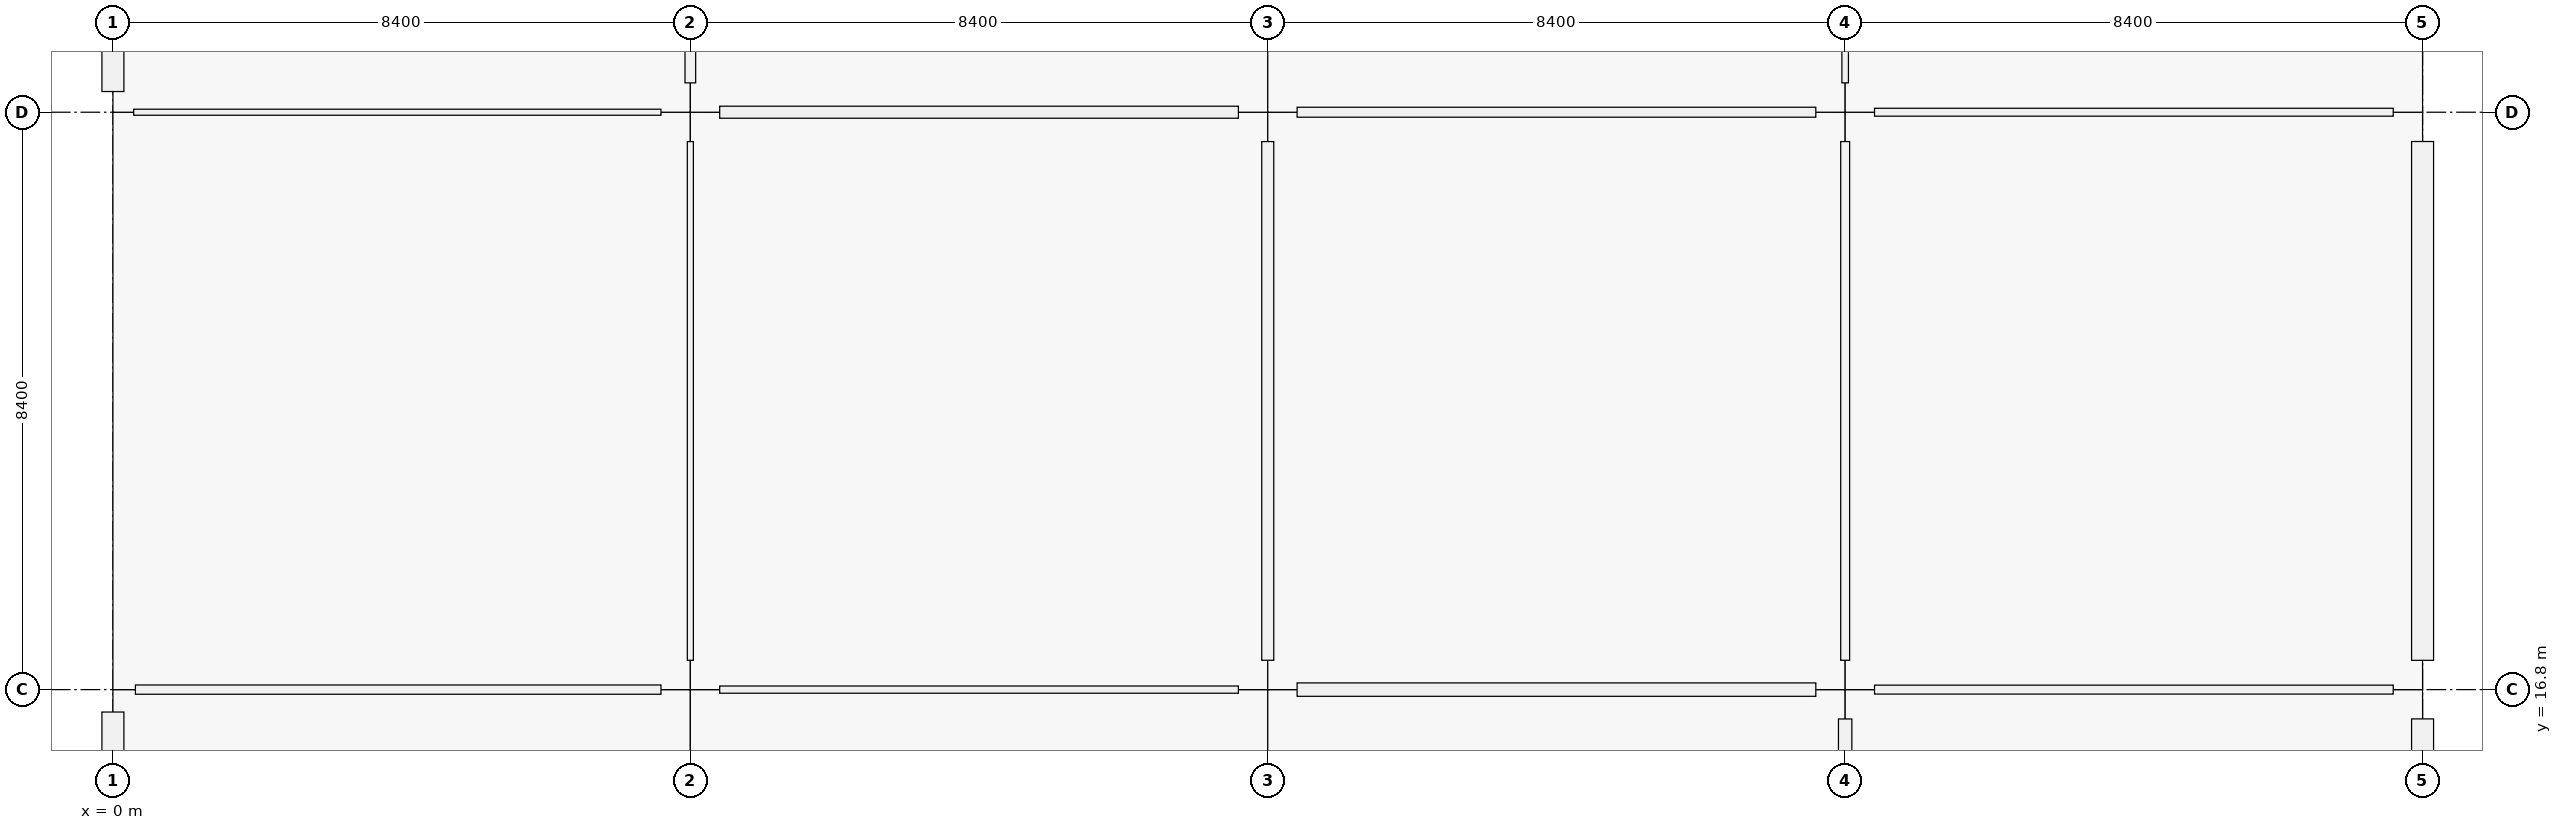
"""IFC4 building model, lengths in metres.
Left out: names, types, materials, properties, quantities, classifications, styles, units other than length and angle.
Written with IfcOpenShell. Run it as: python <this file> out.ifc"""

import sys

from ifc_helpers import new_model, si_unit, direction, frame, frame_2d, origin, origin_2d, place, context, subcontext, project, spatial, rectangle, extrude, element, fill, save


model = new_model("IFC4")
c1 = context("Model", 3, precision=1e-05, world=origin(), true_north=direction((0.0, 1.0)))
c2 = subcontext(c1, "Body", "Model", "MODEL_VIEW")
j1 = project(units=[si_unit("LENGTHUNIT", "METRE"), si_unit("PLANEANGLEUNIT", "RADIAN")], contexts=[c1])
p1 = place(None, origin())
s1 = spatial("IfcSite", under=j1, at=p1, CompositionType="ELEMENT")
p2 = place(p1, origin())
s2 = spatial("IfcBuilding", under=s1, at=p2, CompositionType="ELEMENT")
p3 = place(p2, origin())
s3 = spatial("IfcBuildingStorey", under=s2, at=p3, CompositionType="ELEMENT", Elevation=0.0)
p4 = place(p3, frame((0.0, 16.8, 0.0), z_axis=(0.0, 0.0, 1.0), x_axis=(1.0, 0.0, 0.0)))
e1 = element("IfcColumn", 1, at=p4, inside=s3, PredefinedType="COLUMN", context=c2, shape_type="SweptSolid", body=[
    extrude(rectangle(XDim=0.65, YDim=0.65, at=origin_2d()), origin(), (0.0, 0.0, 1.0), 5.76),
])
p5 = place(p3, frame((0.0, 25.2, 0.0), z_axis=(0.0, 0.0, 1.0), x_axis=(1.0, 0.0, 0.0)))
e2 = element("IfcColumn", 2, at=p5, inside=s3, PredefinedType="COLUMN", context=c2, shape_type="SweptSolid", body=[
    extrude(rectangle(XDim=0.6, YDim=0.6, at=origin_2d()), origin(), (0.0, 0.0, 1.0), 5.76),
])
for number, where, z_axis, x_axis in (
    (3, (8.4, 16.8, 0.0), (0.0, 0.0, 1.0), (1.0, 0.0, 0.0)),
    (4, (8.4, 25.2, 0.0), (0.0, 0.0, 1.0), (1.0, 0.0, 0.0)),
    (5, (16.8, 16.8, 0.0), (0.0, 0.0, 1.0), (1.0, 0.0, 0.0)),
    (6, (16.8, 25.2, 0.0), (0.0, 0.0, 1.0), (1.0, 0.0, 0.0)),
    (7, (25.2, 16.8, 0.0), (0.0, 0.0, 1.0), (1.0, 0.0, 0.0)),
    (8, (25.2, 25.2, 0.0), (0.0, 0.0, 1.0), (1.0, 0.0, 0.0)),
    (9, (33.6, 16.8, 0.0), (0.0, 0.0, 1.0), (1.0, 0.0, 0.0)),
    (10, (33.6, 25.2, 0.0), (0.0, 0.0, 1.0), (1.0, 0.0, 0.0)),
):
    element("IfcColumn", number, at=place(p3, frame(where, z_axis=z_axis, x_axis=x_axis)), inside=s3, PredefinedType="COLUMN", context=c2, shape_type="SweptSolid", body=[
        extrude(rectangle(XDim=0.85, YDim=0.85, at=origin_2d()), origin(), (0.0, 0.0, 1.0), 5.76),
    ])
p6 = place(p3, frame((0.0, 8.701, 0.0), z_axis=(0.0, 0.0, 1.0), x_axis=(0.0, 1.0, 0.0)))
e11 = element("IfcWall", 11, at=p6, inside=s3, PredefinedType="SOLIDWALL", context=c2, shape_type="SweptSolid", body=[
    extrude(rectangle(XDim=7.773, YDim=0.32, at=frame_2d((3.887, 0.0))), origin(), (0.0, 0.0, 1.0), 4.7),
])
p7 = place(p6, frame((2.837, 0.0, 0.9)))
e12 = element("IfcOpeningElement", 12, at=p7, cuts=e11, PredefinedType="OPENING", context=c2, shape_type="SweptSolid", body=[
    extrude(rectangle(XDim=2.1, YDim=1.8, at=frame_2d((1.05, 0.9))), frame((0.0, 0.16, 0.0), z_axis=(0.0, -1.0, 0.0), x_axis=(1.0, 0.0, 0.0)), (0.0, 0.0, 1.0), 0.32),
])
p8 = place(p3, frame((0.0, 25.501, 0.0), z_axis=(0.0, 0.0, 1.0), x_axis=(0.0, 1.0, 0.0)))
e13 = element("IfcWall", 13, at=p8, inside=s3, PredefinedType="SOLIDWALL", context=c2, shape_type="SweptSolid", body=[
    extrude(rectangle(XDim=7.773, YDim=0.32, at=frame_2d((3.886, 0.0))), origin(), (0.0, 0.0, 1.0), 4.7),
])
p9 = place(p8, frame((2.786, 0.0, 0.0)))
e14 = element("IfcOpeningElement", 14, at=p9, cuts=e13, PredefinedType="OPENING", context=c2, shape_type="SweptSolid", body=[
    extrude(rectangle(XDim=2.2, YDim=2.3, at=frame_2d((1.1, 1.15))), frame((0.0, 0.16, 0.0), z_axis=(0.0, -1.0, 0.0), x_axis=(1.0, 0.0, 0.0)), (0.0, 0.0, 1.0), 0.32),
])
p10 = place(p3, frame((33.6, 16.374, 0.0), z_axis=(0.0, 0.0, 1.0), x_axis=(0.0, -1.0, 0.0)))
e15 = element("IfcWall", 15, at=p10, inside=s3, PredefinedType="SOLIDWALL", context=c2, shape_type="SweptSolid", body=[
    extrude(rectangle(XDim=7.623, YDim=0.32, at=frame_2d((3.812, 0.0))), origin(), (0.0, 0.0, 1.0), 4.7),
])
p11 = place(p10, frame((2.462, 0.0, 0.9)))
e16 = element("IfcOpeningElement", 16, at=p11, cuts=e15, PredefinedType="OPENING", context=c2, shape_type="SweptSolid", body=[
    extrude(rectangle(XDim=2.7, YDim=1.2, at=frame_2d((1.35, 0.6))), frame((0.0, 0.16, 0.0), z_axis=(0.0, -1.0, 0.0), x_axis=(1.0, 0.0, 0.0)), (0.0, 0.0, 1.0), 0.32),
])
p12 = place(p3, frame((33.6, 24.774, 0.0), z_axis=(0.0, 0.0, 1.0), x_axis=(0.0, -1.0, 0.0)))
e17 = element("IfcWall", 17, at=p12, inside=s3, PredefinedType="SOLIDWALL", context=c2, shape_type="SweptSolid", body=[
    extrude(rectangle(XDim=7.548, YDim=0.32, at=frame_2d((3.774, 0.0))), origin(), (0.0, 0.0, 1.0), 4.7),
])
p13 = place(p12, frame((2.674, 0.0, 0.9)))
e18 = element("IfcOpeningElement", 18, at=p13, cuts=e17, PredefinedType="OPENING", context=c2, shape_type="SweptSolid", body=[
    extrude(rectangle(XDim=2.2, YDim=1.35, at=frame_2d((1.1, 0.675))), frame((0.0, 0.16, 0.0), z_axis=(0.0, -1.0, 0.0), x_axis=(1.0, 0.0, 0.0)), (0.0, 0.0, 1.0), 0.32),
])
p14 = place(p3, frame((0.327, 16.8, 0.0), z_axis=(0.0, 0.0, 1.0), x_axis=(1.0, 0.0, 0.0)))
e19 = element("IfcWall", 19, at=p14, inside=s3, PredefinedType="PARTITIONING", context=c2, shape_type="SweptSolid", body=[
    extrude(rectangle(XDim=7.646, YDim=0.135, at=frame_2d((3.823, 0.0))), origin(), (0.0, 0.0, 1.0), 3.66),
])
p15 = place(p14, frame((3.358, 0.0, 0.0)))
e20 = element("IfcOpeningElement", 20, at=p15, cuts=e19, PredefinedType="OPENING", context=c2, shape_type="SweptSolid", body=[
    extrude(rectangle(XDim=0.93, YDim=2.12, at=frame_2d((0.465, 1.06))), frame((0.0, 0.067, 0.0), z_axis=(0.0, -1.0, 0.0), x_axis=(1.0, 0.0, 0.0)), (0.0, 0.0, 1.0), 0.135),
])
p16 = place(p3, frame((0.302, 25.2, 0.0), z_axis=(0.0, 0.0, 1.0), x_axis=(1.0, 0.0, 0.0)))
e21 = element("IfcWall", 21, at=p16, inside=s3, PredefinedType="PARTITIONING", context=c2, shape_type="SweptSolid", body=[
    extrude(rectangle(XDim=7.671, YDim=0.088, at=frame_2d((3.835, 0.0))), origin(), (0.0, 0.0, 1.0), 3.66),
])
p17 = place(p16, frame((3.311, 0.0, 0.0)))
e22 = element("IfcOpeningElement", 22, at=p17, cuts=e21, PredefinedType="OPENING", context=c2, shape_type="SweptSolid", body=[
    extrude(rectangle(XDim=1.05, YDim=2.12, at=frame_2d((0.525, 1.06))), frame((0.0, 0.044, 0.0), z_axis=(0.0, -1.0, 0.0), x_axis=(1.0, 0.0, 0.0)), (0.0, 0.0, 1.0), 0.088),
])
p18 = place(p3, frame((8.827, 16.8, 0.0), z_axis=(0.0, 0.0, 1.0), x_axis=(1.0, 0.0, 0.0)))
e23 = element("IfcWall", 23, at=p18, inside=s3, PredefinedType="PARTITIONING", context=c2, shape_type="SweptSolid", body=[
    extrude(rectangle(XDim=7.546, YDim=0.105, at=frame_2d((3.773, 0.0))), origin(), (0.0, 0.0, 1.0), 3.66),
])
p19 = place(p18, frame((3.273, 0.0, 0.0)))
e24 = element("IfcOpeningElement", 24, at=p19, cuts=e23, PredefinedType="OPENING", context=c2, shape_type="SweptSolid", body=[
    extrude(rectangle(XDim=1.0, YDim=2.2, at=frame_2d((0.5, 1.1))), frame((0.0, 0.052, 0.0), z_axis=(0.0, -1.0, 0.0), x_axis=(1.0, 0.0, 0.0)), (0.0, 0.0, 1.0), 0.105),
])
p20 = place(p3, frame((8.827, 25.2, 0.0), z_axis=(0.0, 0.0, 1.0), x_axis=(1.0, 0.0, 0.0)))
e25 = element("IfcWall", 25, at=p20, inside=s3, PredefinedType="PARTITIONING", context=c2, shape_type="SweptSolid", body=[
    extrude(rectangle(XDim=7.546, YDim=0.175, at=frame_2d((3.773, 0.0))), origin(), (0.0, 0.0, 1.0), 3.66),
])
p21 = place(p20, frame((3.253, 0.0, 0.0)))
e26 = element("IfcOpeningElement", 26, at=p21, cuts=e25, PredefinedType="OPENING", context=c2, shape_type="SweptSolid", body=[
    extrude(rectangle(XDim=1.04, YDim=2.2, at=frame_2d((0.52, 1.1))), frame((0.0, 0.087, 0.0), z_axis=(0.0, -1.0, 0.0), x_axis=(1.0, 0.0, 0.0)), (0.0, 0.0, 1.0), 0.175),
])
p22 = place(p3, frame((17.227, 16.8, 0.0), z_axis=(0.0, 0.0, 1.0), x_axis=(1.0, 0.0, 0.0)))
e27 = element("IfcWall", 27, at=p22, inside=s3, PredefinedType="PARTITIONING", context=c2, shape_type="SweptSolid", body=[
    extrude(rectangle(XDim=7.546, YDim=0.195, at=frame_2d((3.773, 0.0))), origin(), (0.0, 0.0, 1.0), 3.66),
])
p23 = place(p22, frame((3.283, 0.0, 0.0)))
e28 = element("IfcOpeningElement", 28, at=p23, cuts=e27, PredefinedType="OPENING", context=c2, shape_type="SweptSolid", body=[
    extrude(rectangle(XDim=0.98, YDim=2.18, at=frame_2d((0.49, 1.09))), frame((0.0, 0.098, 0.0), z_axis=(0.0, -1.0, 0.0), x_axis=(1.0, 0.0, 0.0)), (0.0, 0.0, 1.0), 0.195),
])
p24 = place(p3, frame((17.227, 25.2, 0.0), z_axis=(0.0, 0.0, 1.0), x_axis=(1.0, 0.0, 0.0)))
e29 = element("IfcWall", 29, at=p24, inside=s3, PredefinedType="PARTITIONING", context=c2, shape_type="SweptSolid", body=[
    extrude(rectangle(XDim=7.546, YDim=0.145, at=frame_2d((3.773, 0.0))), origin(), (0.0, 0.0, 1.0), 3.66),
])
p25 = place(p24, frame((3.273, 0.0, 0.0)))
e30 = element("IfcOpeningElement", 30, at=p25, cuts=e29, PredefinedType="OPENING", context=c2, shape_type="SweptSolid", body=[
    extrude(rectangle(XDim=1.0, YDim=2.2, at=frame_2d((0.5, 1.1))), frame((0.0, 0.073, 0.0), z_axis=(0.0, -1.0, 0.0), x_axis=(1.0, 0.0, 0.0)), (0.0, 0.0, 1.0), 0.145),
])
p26 = place(p3, frame((25.627, 16.8, 0.0), z_axis=(0.0, 0.0, 1.0), x_axis=(1.0, 0.0, 0.0)))
e31 = element("IfcWall", 31, at=p26, inside=s3, PredefinedType="MOVABLE", context=c2, shape_type="SweptSolid", body=[
    extrude(rectangle(XDim=7.546, YDim=0.13, at=frame_2d((3.773, 0.0))), origin(), (0.0, 0.0, 1.0), 3.66),
])
p27 = place(p26, frame((3.303, 0.0, 0.0)))
e32 = element("IfcOpeningElement", 32, at=p27, cuts=e31, PredefinedType="OPENING", context=c2, shape_type="SweptSolid", body=[
    extrude(rectangle(XDim=0.94, YDim=2.15, at=frame_2d((0.47, 1.075))), frame((0.0, 0.065, 0.0), z_axis=(0.0, -1.0, 0.0), x_axis=(1.0, 0.0, 0.0)), (0.0, 0.0, 1.0), 0.13),
])
p28 = place(p3, frame((25.627, 25.2, 0.0), z_axis=(0.0, 0.0, 1.0), x_axis=(1.0, 0.0, 0.0)))
e33 = element("IfcWall", 33, at=p28, inside=s3, PredefinedType="PARTITIONING", context=c2, shape_type="SweptSolid", body=[
    extrude(rectangle(XDim=7.546, YDim=0.115, at=frame_2d((3.773, 0.0))), origin(), (0.0, 0.0, 1.0), 3.66),
])
p29 = place(p28, frame((3.288, 0.0, 0.0)))
e34 = element("IfcOpeningElement", 34, at=p29, cuts=e33, PredefinedType="OPENING", context=c2, shape_type="SweptSolid", body=[
    extrude(rectangle(XDim=0.97, YDim=2.12, at=frame_2d((0.485, 1.06))), frame((0.0, 0.058, 0.0), z_axis=(0.0, -1.0, 0.0), x_axis=(1.0, 0.0, 0.0)), (0.0, 0.0, 1.0), 0.115),
])
p30 = place(p3, frame((8.4, 17.227, 0.0), z_axis=(0.0, 0.0, 1.0), x_axis=(0.0, 1.0, 0.0)))
e35 = element("IfcWall", 35, at=p30, inside=s3, PredefinedType="PARTITIONING", context=c2, shape_type="SweptSolid", body=[
    extrude(rectangle(XDim=7.546, YDim=0.088, at=frame_2d((3.773, 0.0))), origin(), (0.0, 0.0, 1.0), 3.66),
])
p31 = place(p30, frame((3.293, 0.0, 0.0)))
e36 = element("IfcOpeningElement", 36, at=p31, cuts=e35, PredefinedType="OPENING", context=c2, shape_type="SweptSolid", body=[
    extrude(rectangle(XDim=0.96, YDim=2.18, at=frame_2d((0.48, 1.09))), frame((0.0, 0.044, 0.0), z_axis=(0.0, -1.0, 0.0), x_axis=(1.0, 0.0, 0.0)), (0.0, 0.0, 1.0), 0.088),
])
p32 = place(p3, frame((8.4, 25.627, 0.0), z_axis=(0.0, 0.0, 1.0), x_axis=(0.0, 1.0, 0.0)))
e37 = element("IfcWall", 37, at=p32, inside=s3, PredefinedType="PARTITIONING", context=c2, shape_type="SweptSolid", body=[
    extrude(rectangle(XDim=7.546, YDim=0.155, at=frame_2d((3.773, 0.0))), origin(), (0.0, 0.0, 1.0), 3.66),
])
p33 = place(p32, frame((3.253, 0.0, 0.0)))
e38 = element("IfcOpeningElement", 38, at=p33, cuts=e37, PredefinedType="OPENING", context=c2, shape_type="SweptSolid", body=[
    extrude(rectangle(XDim=1.04, YDim=2.2, at=frame_2d((0.52, 1.1))), frame((0.0, 0.078, 0.0), z_axis=(0.0, -1.0, 0.0), x_axis=(1.0, 0.0, 0.0)), (0.0, 0.0, 1.0), 0.155),
])
p34 = place(p3, frame((16.8, 17.227, 0.0), z_axis=(0.0, 0.0, 1.0), x_axis=(0.0, 1.0, 0.0)))
e39 = element("IfcWall", 39, at=p34, inside=s3, PredefinedType="PARTITIONING", context=c2, shape_type="SweptSolid", body=[
    extrude(rectangle(XDim=7.546, YDim=0.175, at=frame_2d((3.773, 0.0))), origin(), (0.0, 0.0, 1.0), 3.66),
])
p35 = place(p34, frame((3.313, 0.0, 0.0)))
e40 = element("IfcOpeningElement", 40, at=p35, cuts=e39, PredefinedType="OPENING", context=c2, shape_type="SweptSolid", body=[
    extrude(rectangle(XDim=0.92, YDim=2.15, at=frame_2d((0.46, 1.075))), frame((0.0, 0.087, 0.0), z_axis=(0.0, -1.0, 0.0), x_axis=(1.0, 0.0, 0.0)), (0.0, 0.0, 1.0), 0.175),
])
p36 = place(p3, frame((25.2, 8.777, 0.0), z_axis=(0.0, 0.0, 1.0), x_axis=(0.0, 1.0, 0.0)))
e41 = element("IfcWall", 41, at=p36, inside=s3, PredefinedType="PARTITIONING", context=c2, shape_type="SweptSolid", body=[
    extrude(rectangle(XDim=7.596, YDim=0.195, at=frame_2d((3.798, 0.0))), origin(), (0.0, 0.0, 1.0), 3.66),
])
p37 = place(p36, frame((3.328, 0.0, 0.0)))
e42 = element("IfcOpeningElement", 42, at=p37, cuts=e41, PredefinedType="OPENING", context=c2, shape_type="SweptSolid", body=[
    extrude(rectangle(XDim=0.94, YDim=2.15, at=frame_2d((0.47, 1.075))), frame((0.0, 0.098, 0.0), z_axis=(0.0, -1.0, 0.0), x_axis=(1.0, 0.0, 0.0)), (0.0, 0.0, 1.0), 0.195),
])
p38 = place(p3, frame((25.2, 17.227, 0.0), z_axis=(0.0, 0.0, 1.0), x_axis=(0.0, 1.0, 0.0)))
e43 = element("IfcWall", 43, at=p38, inside=s3, PredefinedType="MOVABLE", context=c2, shape_type="SweptSolid", body=[
    extrude(rectangle(XDim=7.546, YDim=0.13, at=frame_2d((3.773, 0.0))), origin(), (0.0, 0.0, 1.0), 3.66),
])
p39 = place(p38, frame((3.268, 0.0, 0.0)))
e44 = element("IfcOpeningElement", 44, at=p39, cuts=e43, PredefinedType="OPENING", context=c2, shape_type="SweptSolid", body=[
    extrude(rectangle(XDim=1.01, YDim=2.12, at=frame_2d((0.505, 1.06))), frame((0.0, 0.065, 0.0), z_axis=(0.0, -1.0, 0.0), x_axis=(1.0, 0.0, 0.0)), (0.0, 0.0, 1.0), 0.13),
])
p40 = place(p3, frame((25.2, 25.627, 0.0), z_axis=(0.0, 0.0, 1.0), x_axis=(0.0, 1.0, 0.0)))
e45 = element("IfcWall", 45, at=p40, inside=s3, PredefinedType="PARTITIONING", context=c2, shape_type="SweptSolid", body=[
    extrude(rectangle(XDim=7.546, YDim=0.095, at=frame_2d((3.773, 0.0))), origin(), (0.0, 0.0, 1.0), 3.66),
])
p41 = place(p40, frame((3.283, 0.0, 0.0)))
e46 = element("IfcOpeningElement", 46, at=p41, cuts=e45, PredefinedType="OPENING", context=c2, shape_type="SweptSolid", body=[
    extrude(rectangle(XDim=0.98, YDim=2.18, at=frame_2d((0.49, 1.09))), frame((0.0, 0.047, 0.0), z_axis=(0.0, -1.0, 0.0), x_axis=(1.0, 0.0, 0.0)), (0.0, 0.0, 1.0), 0.095),
])
p42 = place(p13, origin())
e47 = element("IfcWindow", 47, at=p42, inside=s3, PartitioningType="SINGLE_PANEL", PredefinedType="WINDOW", context=c2, shape_type="SweptSolid", body=[
    extrude(rectangle(XDim=2.2, YDim=1.35, at=frame_2d((1.1, 0.675))), frame((0.0, 0.03, 0.0), z_axis=(0.0, -1.0, 0.0), x_axis=(1.0, 0.0, 0.0)), (0.0, 0.0, 1.0), 0.06),
])
fill(e18, e47)
p43 = place(p21, origin())
e48 = element("IfcDoor", 48, at=p43, inside=s3, OperationType="SINGLE_SWING_LEFT", PredefinedType="DOOR", context=c2, shape_type="SweptSolid", body=[
    extrude(rectangle(XDim=1.04, YDim=2.2, at=frame_2d((0.52, 1.1))), frame((0.0, 0.025, 0.0), z_axis=(0.0, -1.0, 0.0), x_axis=(1.0, 0.0, 0.0)), (0.0, 0.0, 1.0), 0.05),
])
fill(e26, e48)
p44 = place(p25, origin())
e49 = element("IfcDoor", 49, at=p44, inside=s3, OperationType="SINGLE_SWING_LEFT", PredefinedType="DOOR", context=c2, shape_type="SweptSolid", body=[
    extrude(rectangle(XDim=1.0, YDim=2.2, at=frame_2d((0.5, 1.1))), frame((0.0, 0.025, 0.0), z_axis=(0.0, -1.0, 0.0), x_axis=(1.0, 0.0, 0.0)), (0.0, 0.0, 1.0), 0.05),
])
fill(e30, e49)
p45 = place(p15, origin())
e50 = element("IfcDoor", 50, at=p45, inside=s3, OperationType="SINGLE_SWING_LEFT", PredefinedType="DOOR", context=c2, shape_type="SweptSolid", body=[
    extrude(rectangle(XDim=0.93, YDim=2.12, at=frame_2d((0.465, 1.06))), frame((0.0, 0.025, 0.0), z_axis=(0.0, -1.0, 0.0), x_axis=(1.0, 0.0, 0.0)), (0.0, 0.0, 1.0), 0.05),
])
fill(e20, e50)
p46 = place(p19, origin())
e51 = element("IfcDoor", 51, at=p46, inside=s3, OperationType="SINGLE_SWING_RIGHT", PredefinedType="DOOR", context=c2, shape_type="SweptSolid", body=[
    extrude(rectangle(XDim=1.0, YDim=2.2, at=frame_2d((0.5, 1.1))), frame((0.0, 0.025, 0.0), z_axis=(0.0, -1.0, 0.0), x_axis=(1.0, 0.0, 0.0)), (0.0, 0.0, 1.0), 0.05),
])
fill(e24, e51)
p47 = place(p23, origin())
e52 = element("IfcDoor", 52, at=p47, inside=s3, OperationType="SINGLE_SWING_LEFT", PredefinedType="DOOR", context=c2, shape_type="SweptSolid", body=[
    extrude(rectangle(XDim=0.98, YDim=2.18, at=frame_2d((0.49, 1.09))), frame((0.0, 0.025, 0.0), z_axis=(0.0, -1.0, 0.0), x_axis=(1.0, 0.0, 0.0)), (0.0, 0.0, 1.0), 0.05),
])
fill(e28, e52)
p48 = place(p27, origin())
e53 = element("IfcDoor", 53, at=p48, inside=s3, OperationType="SINGLE_SWING_LEFT", PredefinedType="DOOR", context=c2, shape_type="SweptSolid", body=[
    extrude(rectangle(XDim=0.94, YDim=2.15, at=frame_2d((0.47, 1.075))), frame((0.0, 0.025, 0.0), z_axis=(0.0, -1.0, 0.0), x_axis=(1.0, 0.0, 0.0)), (0.0, 0.0, 1.0), 0.05),
])
fill(e32, e53)
p49 = place(p17, origin())
e54 = element("IfcDoor", 54, at=p49, inside=s3, OperationType="SINGLE_SWING_LEFT", PredefinedType="DOOR", context=c2, shape_type="SweptSolid", body=[
    extrude(rectangle(XDim=1.05, YDim=2.12, at=frame_2d((0.525, 1.06))), frame((0.0, 0.025, 0.0), z_axis=(0.0, -1.0, 0.0), x_axis=(1.0, 0.0, 0.0)), (0.0, 0.0, 1.0), 0.05),
])
fill(e22, e54)
p50 = place(p29, origin())
e55 = element("IfcDoor", 55, at=p50, inside=s3, OperationType="SINGLE_SWING_LEFT", PredefinedType="DOOR", context=c2, shape_type="SweptSolid", body=[
    extrude(rectangle(XDim=0.97, YDim=2.12, at=frame_2d((0.485, 1.06))), frame((0.0, 0.025, 0.0), z_axis=(0.0, -1.0, 0.0), x_axis=(1.0, 0.0, 0.0)), (0.0, 0.0, 1.0), 0.05),
])
fill(e34, e55)
p51 = place(p31, origin())
e56 = element("IfcDoor", 56, at=p51, inside=s3, OperationType="SINGLE_SWING_LEFT", PredefinedType="DOOR", context=c2, shape_type="SweptSolid", body=[
    extrude(rectangle(XDim=0.96, YDim=2.18, at=frame_2d((0.48, 1.09))), frame((0.0, 0.025, 0.0), z_axis=(0.0, -1.0, 0.0), x_axis=(1.0, 0.0, 0.0)), (0.0, 0.0, 1.0), 0.05),
])
fill(e36, e56)
p52 = place(p35, origin())
e57 = element("IfcDoor", 57, at=p52, inside=s3, OperationType="SINGLE_SWING_LEFT", PredefinedType="DOOR", context=c2, shape_type="SweptSolid", body=[
    extrude(rectangle(XDim=0.92, YDim=2.15, at=frame_2d((0.46, 1.075))), frame((0.0, 0.025, 0.0), z_axis=(0.0, -1.0, 0.0), x_axis=(1.0, 0.0, 0.0)), (0.0, 0.0, 1.0), 0.05),
])
fill(e40, e57)
p53 = place(p39, origin())
e58 = element("IfcDoor", 58, at=p53, inside=s3, OperationType="SINGLE_SWING_LEFT", PredefinedType="DOOR", context=c2, shape_type="SweptSolid", body=[
    extrude(rectangle(XDim=1.01, YDim=2.12, at=frame_2d((0.505, 1.06))), frame((0.0, 0.025, 0.0), z_axis=(0.0, -1.0, 0.0), x_axis=(1.0, 0.0, 0.0)), (0.0, 0.0, 1.0), 0.05),
])
fill(e44, e58)
save(model, sys.argv[1])
